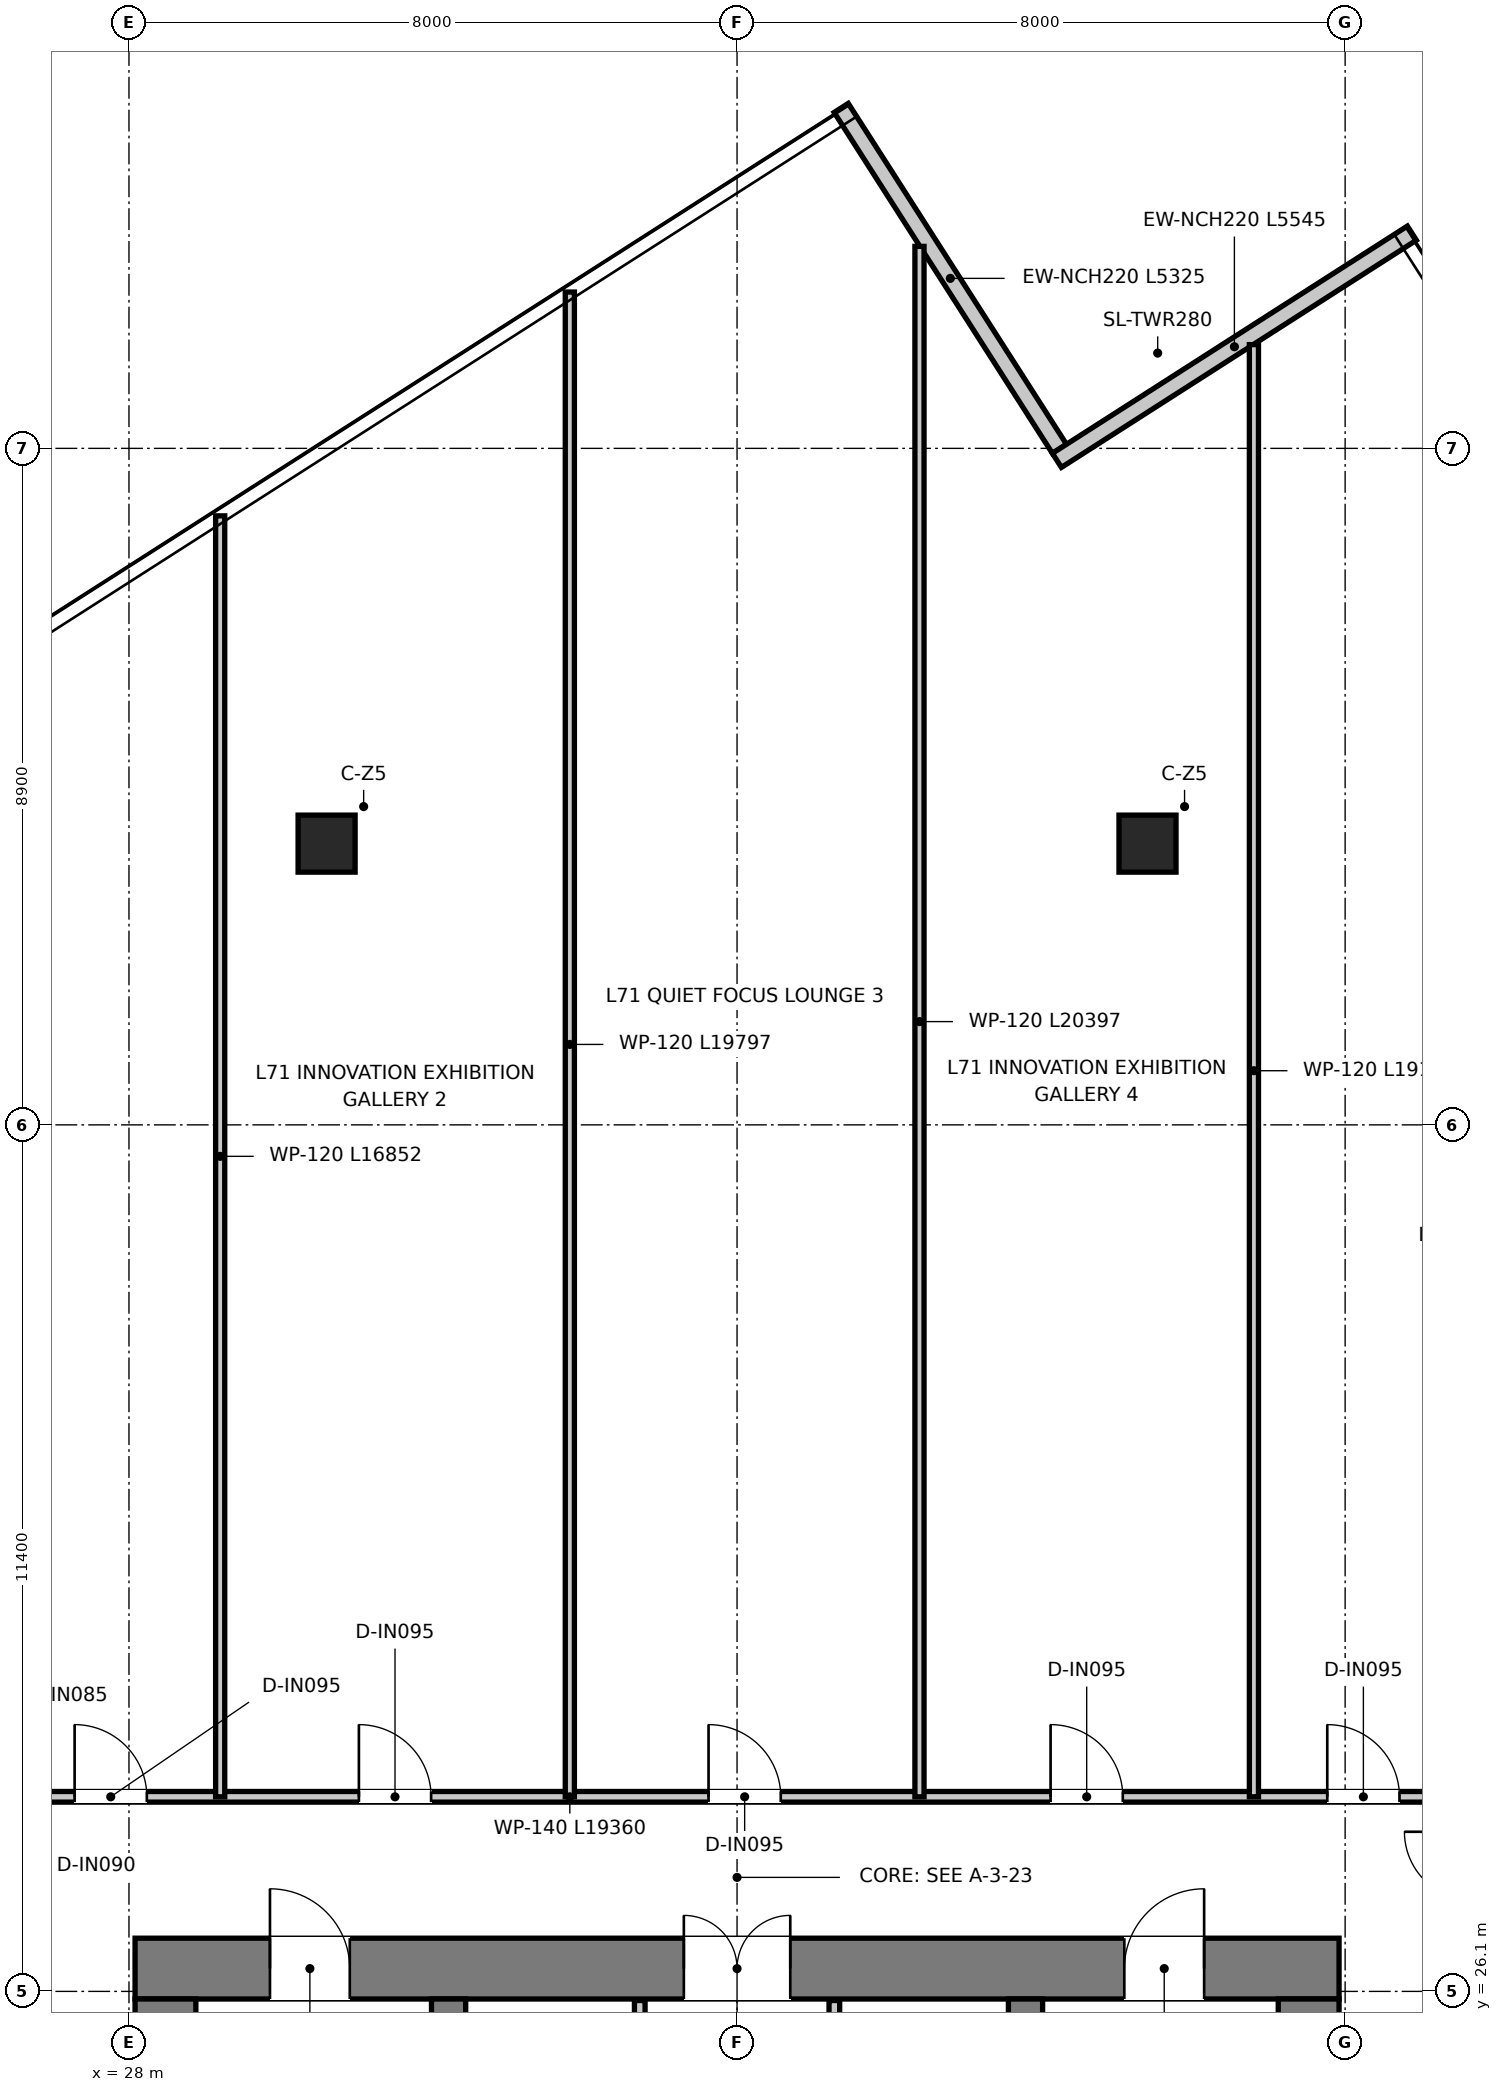
"""IFC4 building model, lengths in metres.
Left out: names, types, materials, properties, quantities, classifications, styles, units other than length and angle.
Written with IfcOpenShell. Run it as: python <this file> out.ifc"""

import sys

from ifc_helpers import new_model, si_unit, direction, frame, frame_2d, origin, origin_2d, place, context, subcontext, project, spatial, rectangle, extrude, source, transform, mapped, element, fill, save


model = new_model("IFC4")
c1 = context("Model", 3, precision=1e-05, world=origin(), true_north=direction((0.0, 1.0)))
c2 = subcontext(c1, "Body", "Model", "MODEL_VIEW")
j1 = project(units=[si_unit("LENGTHUNIT", "METRE"), si_unit("PLANEANGLEUNIT", "RADIAN")], contexts=[c1])
p1 = place(None, origin())
s1 = spatial("IfcSite", under=j1, at=p1, CompositionType="ELEMENT")
p2 = place(p1, origin())
s2 = spatial("IfcBuilding", under=s1, at=p2, CompositionType="ELEMENT")
p3 = place(p2, frame((0.0, 0.0, 291.1)))
s3 = spatial("IfcBuildingStorey", under=s2, at=p3, CompositionType="ELEMENT", Elevation=291.1)
p4 = place(p3, frame((28.08, 26.4, 0.0), z_axis=(0.0, 0.0, 1.0), x_axis=(1.0, 0.0, 0.0)))
e1 = element("IfcWall", 1, at=p4, inside=s3, PredefinedType="SHEAR", context=c2, shape_type="SweptSolid", body=[
    extrude(rectangle(XDim=15.84, YDim=0.8, at=frame_2d((7.92, 0.0))), origin(), (0.0, 0.0, 1.0), 3.95),
])
p5 = place(p4, frame((7.22, 0.0, 0.0)))
e2 = element("IfcOpeningElement", 2, at=p5, cuts=e1, PredefinedType="OPENING", context=c2, shape_type="SweptSolid", body=[
    extrude(rectangle(XDim=1.4, YDim=2.2, at=frame_2d((0.7, 1.1))), frame((0.0, 0.41, 0.0), z_axis=(0.0, -1.0, 0.0), x_axis=(1.0, 0.0, 0.0)), (0.0, 0.0, 1.0), 0.82),
])
p6 = place(p4, frame((1.775, 0.0, 0.0)))
e3 = element("IfcOpeningElement", 3, at=p6, cuts=e1, PredefinedType="OPENING", context=c2, shape_type="SweptSolid", body=[
    extrude(rectangle(XDim=1.05, YDim=2.1, at=frame_2d((0.525, 1.05))), frame((0.0, 0.41, 0.0), z_axis=(0.0, -1.0, 0.0), x_axis=(1.0, 0.0, 0.0)), (0.0, 0.0, 1.0), 0.82),
])
p7 = place(p4, frame((13.015, 0.0, 0.0)))
e4 = element("IfcOpeningElement", 4, at=p7, cuts=e1, PredefinedType="OPENING", context=c2, shape_type="SweptSolid", body=[
    extrude(rectangle(XDim=1.05, YDim=2.1, at=frame_2d((0.525, 1.05))), frame((0.0, 0.41, 0.0), z_axis=(0.0, -1.0, 0.0), x_axis=(1.0, 0.0, 0.0)), (0.0, 0.0, 1.0), 0.82),
])
for number, where, z_axis, x_axis in (
    (5, (28.48, 11.3, 0.0), (0.0, 0.0, 1.0), (0.0, 1.0, 0.0)),
    (6, (43.52, 11.3, 0.0), (0.0, 0.0, 1.0), (0.0, 1.0, 0.0)),
):
    element("IfcWall", number, at=place(p3, frame(where, z_axis=z_axis, x_axis=x_axis)), inside=s3, PredefinedType="SHEAR", context=c2, shape_type="SweptSolid", body=[
        extrude(rectangle(XDim=14.7, YDim=0.8, at=frame_2d((7.35, 0.0))), origin(), (0.0, 0.0, 1.0), 3.95),
    ])
p8 = place(p3, frame((32.205, 13.22, 0.0), z_axis=(0.0, 0.0, 1.0), x_axis=(0.0, 1.0, 0.0)))
e7 = element("IfcWall", 7, at=p8, inside=s3, PredefinedType="SHEAR", context=c2, shape_type="SweptSolid", body=[
    extrude(rectangle(XDim=12.78, YDim=0.45, at=frame_2d((6.39, 0.0))), origin(), (0.0, 0.0, 1.0), 3.95),
])
p9 = place(p8, frame((10.58, 0.0, 0.0)))
e8 = element("IfcOpeningElement", 8, at=p9, cuts=e7, PredefinedType="OPENING", context=c2, shape_type="SweptSolid", body=[
    extrude(rectangle(XDim=1.1, YDim=2.15, at=frame_2d((0.55, 1.075))), frame((0.0, 0.235, 0.0), z_axis=(0.0, -1.0, 0.0), x_axis=(1.0, 0.0, 0.0)), (0.0, 0.0, 1.0), 0.47),
])
p10 = place(p3, frame((39.795, 13.22, 0.0), z_axis=(0.0, 0.0, 1.0), x_axis=(0.0, 1.0, 0.0)))
e9 = element("IfcWall", 9, at=p10, inside=s3, PredefinedType="SHEAR", context=c2, shape_type="SweptSolid", body=[
    extrude(rectangle(XDim=12.78, YDim=0.45, at=frame_2d((6.39, 0.0))), origin(), (0.0, 0.0, 1.0), 3.95),
])
p11 = place(p10, frame((10.58, 0.0, 0.0)))
e10 = element("IfcOpeningElement", 10, at=p11, cuts=e9, PredefinedType="OPENING", context=c2, shape_type="SweptSolid", body=[
    extrude(rectangle(XDim=1.1, YDim=2.15, at=frame_2d((0.55, 1.075))), frame((0.0, 0.235, 0.0), z_axis=(0.0, -1.0, 0.0), x_axis=(1.0, 0.0, 0.0)), (0.0, 0.0, 1.0), 0.47),
])
m1 = source(origin(), c2, "Body", "SweptSolid", [
    extrude(rectangle(XDim=0.75, YDim=0.75, at=origin_2d()), origin(), (0.0, 0.0, 1.0), 3.95),
])
for number, where, z_axis, x_axis in (
    (11, (30.6, 41.2, 0.0), (0.0, 0.0, 1.0), (1.0, 0.0, 0.0)),
    (12, (41.4, 41.2, 0.0), (0.0, 0.0, 1.0), (1.0, 0.0, 0.0)),
):
    element("IfcColumn", number, at=place(p3, frame(where, z_axis=z_axis, x_axis=x_axis)), inside=s3, PredefinedType="COLUMN", context=c2, shape_type="MappedRepresentation", body=[
        mapped(m1, transform((0.0, 0.0, 0.0), x_axis=(1.0, 0.0, 0.0), y_axis=(0.0, 1.0, 0.0), z_axis=(0.0, 0.0, 1.0), scale=1.0)),
    ])
p12 = place(p3, frame((40.241, 46.394, 0.0), z_axis=(0.0, 0.0, 1.0), x_axis=(-0.539157771194, 0.842204783744, 0.0)))
e13 = element("IfcWall", 13, at=p12, inside=s3, PredefinedType="ELEMENTEDWALL", context=c2, shape_type="SweptSolid", body=[
    extrude(rectangle(XDim=5.325, YDim=0.22, at=frame_2d((2.663, 0.0))), origin(), (0.0, 0.0, 1.0), 3.67),
])
p13 = place(p3, frame((44.878, 49.232, 0.0), z_axis=(0.0, 0.0, 1.0), x_axis=(-0.842222620948, -0.539129907131, 0.0)))
e14 = element("IfcWall", 14, at=p13, inside=s3, PredefinedType="ELEMENTEDWALL", context=c2, shape_type="SweptSolid", body=[
    extrude(rectangle(XDim=5.545, YDim=0.22, at=frame_2d((2.772, 0.0))), origin(), (0.0, 0.0, 1.0), 3.67),
])
p14 = place(p3, frame((34.72, 20.2, 0.0), z_axis=(0.0, 0.0, 1.0), x_axis=(0.0, 1.0, 0.0)))
e15 = element("IfcWall", 15, at=p14, inside=s3, PredefinedType="PARTITIONING", context=c2, shape_type="SweptSolid", body=[
    extrude(rectangle(XDim=5.78, YDim=0.14, at=frame_2d((2.89, 0.0))), origin(), (0.0, 0.0, 1.0), 2.82),
])
p15 = place(p14, frame((1.05, 0.0, 0.0)))
e16 = element("IfcOpeningElement", 16, at=p15, cuts=e15, PredefinedType="OPENING", context=c2, shape_type="SweptSolid", body=[
    extrude(rectangle(XDim=0.9, YDim=2.1, at=frame_2d((0.45, 1.05))), frame((0.0, 0.08, 0.0), z_axis=(0.0, -1.0, 0.0), x_axis=(1.0, 0.0, 0.0)), (0.0, 0.0, 1.0), 0.16),
])
p16 = place(p3, frame((37.28, 20.2, 0.0), z_axis=(0.0, 0.0, 1.0), x_axis=(0.0, 1.0, 0.0)))
e17 = element("IfcWall", 17, at=p16, inside=s3, PredefinedType="PARTITIONING", context=c2, shape_type="SweptSolid", body=[
    extrude(rectangle(XDim=5.78, YDim=0.14, at=frame_2d((2.89, 0.0))), origin(), (0.0, 0.0, 1.0), 2.82),
])
p17 = place(p16, frame((0.95, 0.0, 0.0)))
e18 = element("IfcOpeningElement", 18, at=p17, cuts=e17, PredefinedType="OPENING", context=c2, shape_type="SweptSolid", body=[
    extrude(rectangle(XDim=1.1, YDim=2.15, at=frame_2d((0.55, 1.075))), frame((0.0, 0.08, 0.0), z_axis=(0.0, -1.0, 0.0), x_axis=(1.0, 0.0, 0.0)), (0.0, 0.0, 1.0), 0.16),
])
p18 = place(p3, frame((26.32, 28.66, 0.0), z_axis=(0.0, 0.0, 1.0), x_axis=(1.0, 0.0, 0.0)))
e19 = element("IfcWall", 19, at=p18, inside=s3, PredefinedType="PARTITIONING", context=c2, shape_type="SweptSolid", body=[
    extrude(rectangle(XDim=19.36, YDim=0.14, at=frame_2d((9.68, 0.0))), origin(), (0.0, 0.0, 1.0), 3.18),
])
p19 = place(p18, frame((0.965, 0.0, 0.0)))
e20 = element("IfcOpeningElement", 20, at=p19, cuts=e19, PredefinedType="OPENING", context=c2, shape_type="SweptSolid", body=[
    extrude(rectangle(XDim=0.95, YDim=2.1, at=frame_2d((0.475, 1.05))), frame((0.0, 0.08, 0.0), z_axis=(0.0, -1.0, 0.0), x_axis=(1.0, 0.0, 0.0)), (0.0, 0.0, 1.0), 0.16),
])
p20 = place(p18, frame((4.705, 0.0, 0.0)))
e21 = element("IfcOpeningElement", 21, at=p20, cuts=e19, PredefinedType="OPENING", context=c2, shape_type="SweptSolid", body=[
    extrude(rectangle(XDim=0.95, YDim=2.1, at=frame_2d((0.475, 1.05))), frame((0.0, 0.08, 0.0), z_axis=(0.0, -1.0, 0.0), x_axis=(1.0, 0.0, 0.0)), (0.0, 0.0, 1.0), 0.16),
])
p21 = place(p18, frame((9.305, 0.0, 0.0)))
e22 = element("IfcOpeningElement", 22, at=p21, cuts=e19, PredefinedType="OPENING", context=c2, shape_type="SweptSolid", body=[
    extrude(rectangle(XDim=0.95, YDim=2.1, at=frame_2d((0.475, 1.05))), frame((0.0, 0.08, 0.0), z_axis=(0.0, -1.0, 0.0), x_axis=(1.0, 0.0, 0.0)), (0.0, 0.0, 1.0), 0.16),
])
p22 = place(p18, frame((13.805, 0.0, 0.0)))
e23 = element("IfcOpeningElement", 23, at=p22, cuts=e19, PredefinedType="OPENING", context=c2, shape_type="SweptSolid", body=[
    extrude(rectangle(XDim=0.95, YDim=2.1, at=frame_2d((0.475, 1.05))), frame((0.0, 0.08, 0.0), z_axis=(0.0, -1.0, 0.0), x_axis=(1.0, 0.0, 0.0)), (0.0, 0.0, 1.0), 0.16),
])
p23 = place(p18, frame((17.445, 0.0, 0.0)))
e24 = element("IfcOpeningElement", 24, at=p23, cuts=e19, PredefinedType="OPENING", context=c2, shape_type="SweptSolid", body=[
    extrude(rectangle(XDim=0.95, YDim=2.1, at=frame_2d((0.475, 1.05))), frame((0.0, 0.08, 0.0), z_axis=(0.0, -1.0, 0.0), x_axis=(1.0, 0.0, 0.0)), (0.0, 0.0, 1.0), 0.16),
])
p24 = place(p3, frame((29.2, 28.66, 0.0), z_axis=(0.0, 0.0, 1.0), x_axis=(0.0, 1.0, 0.0)))
e25 = element("IfcWall", 25, at=p24, inside=s3, PredefinedType="PARTITIONING", context=c2, shape_type="SweptSolid", body=[
    extrude(rectangle(XDim=16.852, YDim=0.12, at=frame_2d((8.426, 0.0))), origin(), (0.0, 0.0, 1.0), 3.13),
])
p25 = place(p3, frame((33.8, 28.66, 0.0), z_axis=(0.0, 0.0, 1.0), x_axis=(0.0, 1.0, 0.0)))
e26 = element("IfcWall", 26, at=p25, inside=s3, PredefinedType="PARTITIONING", context=c2, shape_type="SweptSolid", body=[
    extrude(rectangle(XDim=19.797, YDim=0.12, at=frame_2d((9.898, 0.0))), origin(), (0.0, 0.0, 1.0), 3.13),
])
p26 = place(p3, frame((38.4, 28.66, 0.0), z_axis=(0.0, 0.0, 1.0), x_axis=(0.0, 1.0, 0.0)))
e27 = element("IfcWall", 27, at=p26, inside=s3, PredefinedType="PARTITIONING", context=c2, shape_type="SweptSolid", body=[
    extrude(rectangle(XDim=20.397, YDim=0.12, at=frame_2d((10.199, 0.0))), origin(), (0.0, 0.0, 1.0), 3.13),
])
p27 = place(p3, frame((42.8, 28.66, 0.0), z_axis=(0.0, 0.0, 1.0), x_axis=(0.0, 1.0, 0.0)))
e28 = element("IfcWall", 28, at=p27, inside=s3, PredefinedType="PARTITIONING", context=c2, shape_type="SweptSolid", body=[
    extrude(rectangle(XDim=19.105, YDim=0.12, at=frame_2d((9.552, 0.0))), origin(), (0.0, 0.0, 1.0), 3.13),
])
p28 = place(p5, origin())
e29 = element("IfcDoor", 29, at=p28, inside=s3, OperationType="DOUBLE_DOOR_SINGLE_SWING", PredefinedType="DOOR", context=c2, shape_type="SweptSolid", body=[
    extrude(rectangle(XDim=1.4, YDim=2.2, at=frame_2d((0.7, 1.1))), frame((0.0, 0.025, 0.0), z_axis=(0.0, -1.0, 0.0), x_axis=(1.0, 0.0, 0.0)), (0.0, 0.0, 1.0), 0.05),
])
fill(e2, e29)
p29 = place(p6, origin())
e30 = element("IfcDoor", 30, at=p29, inside=s3, OperationType="SINGLE_SWING_LEFT", PredefinedType="DOOR", context=c2, shape_type="SweptSolid", body=[
    extrude(rectangle(XDim=1.05, YDim=2.1, at=frame_2d((0.525, 1.05))), frame((0.0, 0.025, 0.0), z_axis=(0.0, -1.0, 0.0), x_axis=(1.0, 0.0, 0.0)), (0.0, 0.0, 1.0), 0.05),
])
fill(e3, e30)
p30 = place(p7, origin())
e31 = element("IfcDoor", 31, at=p30, inside=s3, OperationType="SINGLE_SWING_RIGHT", PredefinedType="DOOR", context=c2, shape_type="SweptSolid", body=[
    extrude(rectangle(XDim=1.05, YDim=2.1, at=frame_2d((0.525, 1.05))), frame((0.0, 0.025, 0.0), z_axis=(0.0, -1.0, 0.0), x_axis=(1.0, 0.0, 0.0)), (0.0, 0.0, 1.0), 0.05),
])
fill(e4, e31)
p31 = place(p19, origin())
e32 = element("IfcDoor", 32, at=p31, inside=s3, OperationType="SINGLE_SWING_LEFT", PredefinedType="DOOR", context=c2, shape_type="SweptSolid", body=[
    extrude(rectangle(XDim=0.95, YDim=2.1, at=frame_2d((0.475, 1.05))), frame((0.0, 0.025, 0.0), z_axis=(0.0, -1.0, 0.0), x_axis=(1.0, 0.0, 0.0)), (0.0, 0.0, 1.0), 0.05),
])
fill(e20, e32)
p32 = place(p20, origin())
e33 = element("IfcDoor", 33, at=p32, inside=s3, OperationType="SINGLE_SWING_LEFT", PredefinedType="DOOR", context=c2, shape_type="SweptSolid", body=[
    extrude(rectangle(XDim=0.95, YDim=2.1, at=frame_2d((0.475, 1.05))), frame((0.0, 0.025, 0.0), z_axis=(0.0, -1.0, 0.0), x_axis=(1.0, 0.0, 0.0)), (0.0, 0.0, 1.0), 0.05),
])
fill(e21, e33)
p33 = place(p21, origin())
e34 = element("IfcDoor", 34, at=p33, inside=s3, OperationType="SINGLE_SWING_LEFT", PredefinedType="DOOR", context=c2, shape_type="SweptSolid", body=[
    extrude(rectangle(XDim=0.95, YDim=2.1, at=frame_2d((0.475, 1.05))), frame((0.0, 0.025, 0.0), z_axis=(0.0, -1.0, 0.0), x_axis=(1.0, 0.0, 0.0)), (0.0, 0.0, 1.0), 0.05),
])
fill(e22, e34)
p34 = place(p22, origin())
e35 = element("IfcDoor", 35, at=p34, inside=s3, OperationType="SINGLE_SWING_LEFT", PredefinedType="DOOR", context=c2, shape_type="SweptSolid", body=[
    extrude(rectangle(XDim=0.95, YDim=2.1, at=frame_2d((0.475, 1.05))), frame((0.0, 0.025, 0.0), z_axis=(0.0, -1.0, 0.0), x_axis=(1.0, 0.0, 0.0)), (0.0, 0.0, 1.0), 0.05),
])
fill(e23, e35)
p35 = place(p23, origin())
e36 = element("IfcDoor", 36, at=p35, inside=s3, OperationType="SINGLE_SWING_LEFT", PredefinedType="DOOR", context=c2, shape_type="SweptSolid", body=[
    extrude(rectangle(XDim=0.95, YDim=2.1, at=frame_2d((0.475, 1.05))), frame((0.0, 0.025, 0.0), z_axis=(0.0, -1.0, 0.0), x_axis=(1.0, 0.0, 0.0)), (0.0, 0.0, 1.0), 0.05),
])
fill(e24, e36)
save(model, sys.argv[1])
